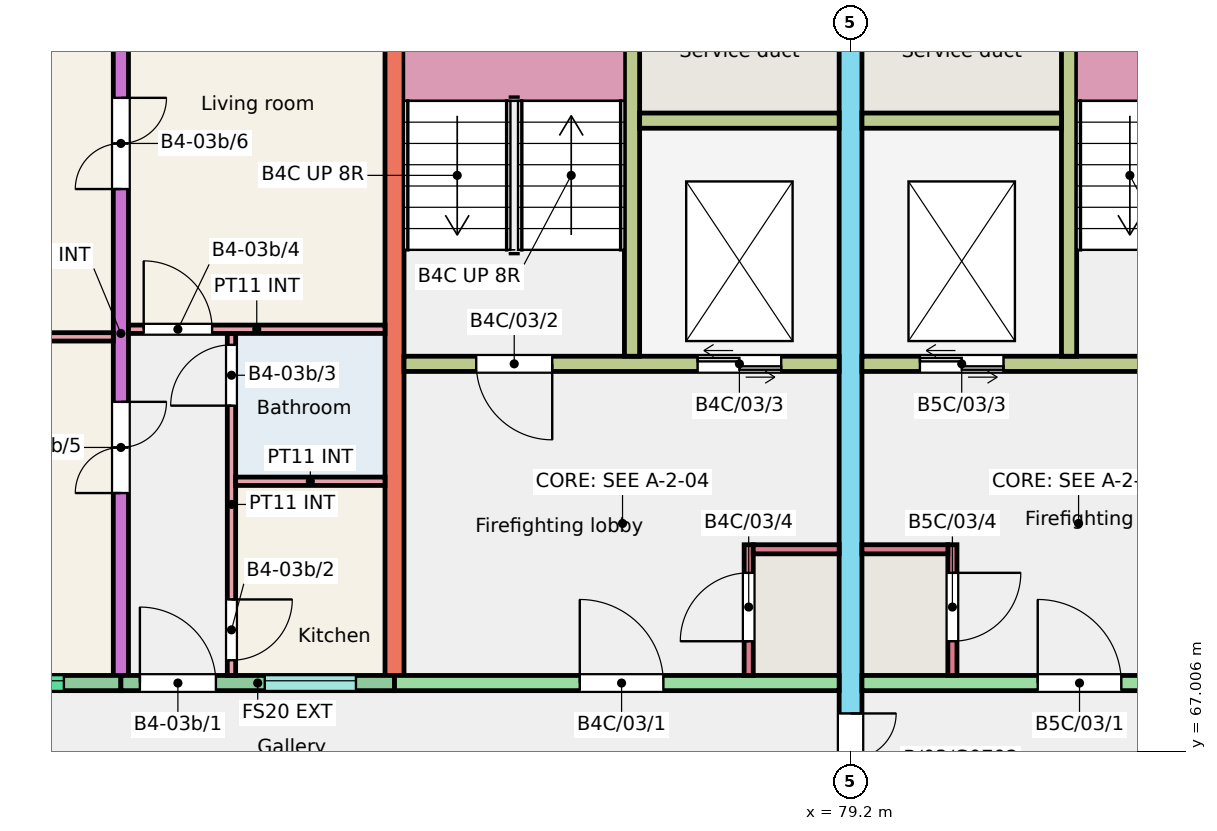
"""IFC4 building model, lengths in metres.
Left out: names, types, materials, properties, quantities, classifications, styles, units other than length and angle.
Written with IfcOpenShell. Run it as: python <this file> out.ifc"""

import sys

from ifc_helpers import new_model, si_unit, direction, frame, frame_2d, origin, place, context, subcontext, project, spatial, rectangle, extrude, element, fill, save


model = new_model("IFC4")
c1 = context("Model", 3, precision=1e-05, world=origin(), true_north=direction((0.0, 1.0)))
c2 = subcontext(c1, "Body", "Model", "MODEL_VIEW")
j1 = project(units=[si_unit("LENGTHUNIT", "METRE"), si_unit("PLANEANGLEUNIT", "RADIAN")], contexts=[c1])
p1 = place(None, origin())
s1 = spatial("IfcSite", under=j1, at=p1, CompositionType="ELEMENT")
p2 = place(p1, origin())
s2 = spatial("IfcBuilding", under=s1, at=p2, CompositionType="ELEMENT")
p3 = place(p2, frame((0.0, 0.0, 9.0)))
s3 = spatial("IfcBuildingStorey", under=s2, at=p3, CompositionType="ELEMENT", Elevation=9.0)
p4 = place(p3, frame((69.6, 68.0, 0.0), z_axis=(0.0, 0.0, 1.0), x_axis=(0.0, 1.0, 0.0)))
e1 = element("IfcWall", 1, at=p4, inside=s3, PredefinedType="SHEAR", context=c2, shape_type="SweptSolid", body=[
    extrude(rectangle(XDim=9.0, YDim=0.2, at=frame_2d((4.5, 0.0))), origin(), (0.0, 0.0, 1.0), 3.0),
])
p5 = place(p4, frame((2.4, 0.0, 0.0)))
e2 = element("IfcOpeningElement", 2, at=p5, cuts=e1, PredefinedType="OPENING", context=c2, shape_type="SweptSolid", body=[
    extrude(rectangle(XDim=1.2, YDim=2.1, at=frame_2d((0.6, 1.05))), frame((0.0, 0.11, 0.0), z_axis=(0.0, -1.0, 0.0), x_axis=(1.0, 0.0, 0.0)), (0.0, 0.0, 1.0), 0.22),
])
p6 = place(p4, frame((6.4, 0.0, 0.0)))
e3 = element("IfcOpeningElement", 3, at=p6, cuts=e1, PredefinedType="OPENING", context=c2, shape_type="SweptSolid", body=[
    extrude(rectangle(XDim=1.2, YDim=2.1, at=frame_2d((0.6, 1.05))), frame((0.0, 0.11, 0.0), z_axis=(0.0, -1.0, 0.0), x_axis=(1.0, 0.0, 0.0)), (0.0, 0.0, 1.0), 0.22),
])
p7 = place(p3, frame((73.2, 68.0, 0.0), z_axis=(0.0, 0.0, 1.0), x_axis=(0.0, 1.0, 0.0)))
e4 = element("IfcWall", 4, at=p7, inside=s3, PredefinedType="SHEAR", context=c2, shape_type="SweptSolid", body=[
    extrude(rectangle(XDim=9.0, YDim=0.25, at=frame_2d((4.5, 0.0))), origin(), (0.0, 0.0, 1.0), 3.0),
])
p8 = place(p3, frame((79.2, 66.0, 0.0), z_axis=(0.0, 0.0, 1.0), x_axis=(0.0, 1.0, 0.0)))
e5 = element("IfcWall", 5, at=p8, inside=s3, PredefinedType="SHEAR", context=c2, shape_type="SweptSolid", body=[
    extrude(rectangle(XDim=11.0, YDim=0.3, at=frame_2d((5.5, 0.0))), origin(), (0.0, 0.0, 1.0), 3.0),
])
p9 = place(p8, frame((0.3, 0.0, 0.0)))
e6 = element("IfcOpeningElement", 6, at=p9, cuts=e5, PredefinedType="OPENING", context=c2, shape_type="SweptSolid", body=[
    extrude(rectangle(XDim=1.2, YDim=2.1, at=frame_2d((0.6, 1.05))), frame((0.0, 0.16, 0.0), z_axis=(0.0, -1.0, 0.0), x_axis=(1.0, 0.0, 0.0)), (0.0, 0.0, 1.0), 0.32),
])
p10 = place(p3, frame((66.0, 67.9, 0.0), z_axis=(0.0, 0.0, 1.0), x_axis=(1.0, 0.0, 0.0)))
e7 = element("IfcWall", 7, at=p10, inside=s3, PredefinedType="SOLIDWALL", context=c2, shape_type="SweptSolid", body=[
    extrude(rectangle(XDim=3.6, YDim=0.2, at=frame_2d((1.8, 0.0))), origin(), (0.0, 0.0, 1.0), 3.0),
])
p11 = place(p10, frame((0.75, 0.0, 1.2)))
e8 = element("IfcOpeningElement", 8, at=p11, cuts=e7, PredefinedType="OPENING", context=c2, shape_type="SweptSolid", body=[
    extrude(rectangle(XDim=2.1, YDim=1.2, at=frame_2d((1.05, 0.6))), frame((0.0, 0.11, 0.0), z_axis=(0.0, -1.0, 0.0), x_axis=(1.0, 0.0, 0.0)), (0.0, 0.0, 1.0), 0.22),
])
p12 = place(p3, frame((69.6, 67.9, 0.0), z_axis=(0.0, 0.0, 1.0), x_axis=(1.0, 0.0, 0.0)))
e9 = element("IfcWall", 9, at=p12, inside=s3, PredefinedType="SOLIDWALL", context=c2, shape_type="SweptSolid", body=[
    extrude(rectangle(XDim=3.6, YDim=0.2, at=frame_2d((1.8, 0.0))), origin(), (0.0, 0.0, 1.0), 3.0),
])
p13 = place(p12, frame((1.893, 0.0, 1.1)))
e10 = element("IfcOpeningElement", 10, at=p13, cuts=e9, PredefinedType="OPENING", context=c2, shape_type="SweptSolid", body=[
    extrude(rectangle(XDim=1.2, YDim=1.3, at=frame_2d((0.6, 0.65))), frame((0.0, 0.11, 0.0), z_axis=(0.0, -1.0, 0.0), x_axis=(1.0, 0.0, 0.0)), (0.0, 0.0, 1.0), 0.22),
])
p14 = place(p12, frame((0.25, 0.0, 0.0)))
e11 = element("IfcOpeningElement", 11, at=p14, cuts=e9, PredefinedType="OPENING", context=c2, shape_type="SweptSolid", body=[
    extrude(rectangle(XDim=1.0, YDim=2.1, at=frame_2d((0.5, 1.05))), frame((0.0, 0.11, 0.0), z_axis=(0.0, -1.0, 0.0), x_axis=(1.0, 0.0, 0.0)), (0.0, 0.0, 1.0), 0.22),
])
p15 = place(p3, frame((73.2, 67.9, 0.0), z_axis=(0.0, 0.0, 1.0), x_axis=(1.0, 0.0, 0.0)))
e12 = element("IfcWall", 12, at=p15, inside=s3, PredefinedType="SHEAR", context=c2, shape_type="SweptSolid", body=[
    extrude(rectangle(XDim=5.85, YDim=0.2, at=frame_2d((2.925, 0.0))), origin(), (0.0, 0.0, 1.0), 3.0),
])
p16 = place(p15, frame((2.438, 0.0, 0.0)))
e13 = element("IfcOpeningElement", 13, at=p16, cuts=e12, PredefinedType="OPENING", context=c2, shape_type="SweptSolid", body=[
    extrude(rectangle(XDim=1.1, YDim=2.1, at=frame_2d((0.55, 1.05))), frame((0.0, 0.11, 0.0), z_axis=(0.0, -1.0, 0.0), x_axis=(1.0, 0.0, 0.0)), (0.0, 0.0, 1.0), 0.22),
])
p17 = place(p3, frame((73.325, 72.1, 0.0), z_axis=(0.0, 0.0, 1.0), x_axis=(1.0, 0.0, 0.0)))
e14 = element("IfcWall", 14, at=p17, inside=s3, PredefinedType="SHEAR", context=c2, shape_type="SweptSolid", body=[
    extrude(rectangle(XDim=5.725, YDim=0.2, at=frame_2d((2.863, 0.0))), origin(), (0.0, 0.0, 1.0), 3.0),
])
p18 = place(p17, frame((0.95, 0.0, 0.0)))
e15 = element("IfcOpeningElement", 15, at=p18, cuts=e14, PredefinedType="OPENING", context=c2, shape_type="SweptSolid", body=[
    extrude(rectangle(XDim=1.0, YDim=2.1, at=frame_2d((0.5, 1.05))), frame((0.0, 0.11, 0.0), z_axis=(0.0, -1.0, 0.0), x_axis=(1.0, 0.0, 0.0)), (0.0, 0.0, 1.0), 0.22),
])
p19 = place(p17, frame((3.863, 0.0, 0.0)))
e16 = element("IfcOpeningElement", 16, at=p19, cuts=e14, PredefinedType="OPENING", context=c2, shape_type="SweptSolid", body=[
    extrude(rectangle(XDim=1.1, YDim=2.1, at=frame_2d((0.55, 1.05))), frame((0.0, 0.11, 0.0), z_axis=(0.0, -1.0, 0.0), x_axis=(1.0, 0.0, 0.0)), (0.0, 0.0, 1.0), 0.22),
])
p20 = place(p3, frame((76.325, 72.2, 0.0), z_axis=(0.0, 0.0, 1.0), x_axis=(0.0, 1.0, 0.0)))
e17 = element("IfcWall", 17, at=p20, inside=s3, PredefinedType="SHEAR", context=c2, shape_type="SweptSolid", body=[
    extrude(rectangle(XDim=4.8, YDim=0.2, at=frame_2d((2.4, 0.0))), origin(), (0.0, 0.0, 1.0), 3.0),
])
p21 = place(p3, frame((76.425, 75.3, 0.0), z_axis=(0.0, 0.0, 1.0), x_axis=(1.0, 0.0, 0.0)))
e18 = element("IfcWall", 18, at=p21, inside=s3, PredefinedType="SHEAR", context=c2, shape_type="SweptSolid", body=[
    extrude(rectangle(XDim=2.625, YDim=0.2, at=frame_2d((1.312, 0.0))), origin(), (0.0, 0.0, 1.0), 3.0),
])
p22 = place(p3, frame((77.86, 68.0, 0.0), z_axis=(0.0, 0.0, 1.0), x_axis=(0.0, 1.0, 0.0)))
e19 = element("IfcWall", 19, at=p22, inside=s3, PredefinedType="SHEAR", context=c2, shape_type="SweptSolid", body=[
    extrude(rectangle(XDim=1.72, YDim=0.12, at=frame_2d((0.86, 0.0))), origin(), (0.0, 0.0, 1.0), 3.0),
])
p23 = place(p22, frame((0.45, 0.0, 0.0)))
e20 = element("IfcOpeningElement", 20, at=p23, cuts=e19, PredefinedType="OPENING", context=c2, shape_type="SweptSolid", body=[
    extrude(rectangle(XDim=0.9, YDim=2.1, at=frame_2d((0.45, 1.05))), frame((0.0, 0.07, 0.0), z_axis=(0.0, -1.0, 0.0), x_axis=(1.0, 0.0, 0.0)), (0.0, 0.0, 1.0), 0.14),
])
p24 = place(p3, frame((77.92, 69.66, 0.0), z_axis=(0.0, 0.0, 1.0), x_axis=(1.0, 0.0, 0.0)))
e21 = element("IfcWall", 21, at=p24, inside=s3, PredefinedType="SHEAR", context=c2, shape_type="SweptSolid", body=[
    extrude(rectangle(XDim=1.13, YDim=0.12, at=frame_2d((0.565, 0.0))), origin(), (0.0, 0.0, 1.0), 3.0),
])
p25 = place(p3, frame((79.35, 67.9, 0.0), z_axis=(0.0, 0.0, 1.0), x_axis=(1.0, 0.0, 0.0)))
e22 = element("IfcWall", 22, at=p25, inside=s3, PredefinedType="SHEAR", context=c2, shape_type="SweptSolid", body=[
    extrude(rectangle(XDim=5.85, YDim=0.2, at=frame_2d((2.925, 0.0))), origin(), (0.0, 0.0, 1.0), 3.0),
])
p26 = place(p25, frame((2.312, 0.0, 0.0)))
e23 = element("IfcOpeningElement", 23, at=p26, cuts=e22, PredefinedType="OPENING", context=c2, shape_type="SweptSolid", body=[
    extrude(rectangle(XDim=1.1, YDim=2.1, at=frame_2d((0.55, 1.05))), frame((0.0, 0.11, 0.0), z_axis=(0.0, -1.0, 0.0), x_axis=(1.0, 0.0, 0.0)), (0.0, 0.0, 1.0), 0.22),
])
p27 = place(p3, frame((79.35, 72.1, 0.0), z_axis=(0.0, 0.0, 1.0), x_axis=(1.0, 0.0, 0.0)))
e24 = element("IfcWall", 24, at=p27, inside=s3, PredefinedType="SHEAR", context=c2, shape_type="SweptSolid", body=[
    extrude(rectangle(XDim=5.725, YDim=0.2, at=frame_2d((2.862, 0.0))), origin(), (0.0, 0.0, 1.0), 3.0),
])
p28 = place(p27, frame((3.775, 0.0, 0.0)))
e25 = element("IfcOpeningElement", 25, at=p28, cuts=e24, PredefinedType="OPENING", context=c2, shape_type="SweptSolid", body=[
    extrude(rectangle(XDim=1.0, YDim=2.1, at=frame_2d((0.5, 1.05))), frame((0.0, 0.11, 0.0), z_axis=(0.0, -1.0, 0.0), x_axis=(1.0, 0.0, 0.0)), (0.0, 0.0, 1.0), 0.22),
])
p29 = place(p27, frame((0.762, 0.0, 0.0)))
e26 = element("IfcOpeningElement", 26, at=p29, cuts=e24, PredefinedType="OPENING", context=c2, shape_type="SweptSolid", body=[
    extrude(rectangle(XDim=1.1, YDim=2.1, at=frame_2d((0.55, 1.05))), frame((0.0, 0.11, 0.0), z_axis=(0.0, -1.0, 0.0), x_axis=(1.0, 0.0, 0.0)), (0.0, 0.0, 1.0), 0.22),
])
p30 = place(p3, frame((82.075, 72.2, 0.0), z_axis=(0.0, 0.0, 1.0), x_axis=(0.0, 1.0, 0.0)))
e27 = element("IfcWall", 27, at=p30, inside=s3, PredefinedType="SHEAR", context=c2, shape_type="SweptSolid", body=[
    extrude(rectangle(XDim=4.8, YDim=0.2, at=frame_2d((2.4, 0.0))), origin(), (0.0, 0.0, 1.0), 3.0),
])
p31 = place(p3, frame((79.35, 75.3, 0.0), z_axis=(0.0, 0.0, 1.0), x_axis=(1.0, 0.0, 0.0)))
e28 = element("IfcWall", 28, at=p31, inside=s3, PredefinedType="SHEAR", context=c2, shape_type="SweptSolid", body=[
    extrude(rectangle(XDim=2.625, YDim=0.2, at=frame_2d((1.312, 0.0))), origin(), (0.0, 0.0, 1.0), 3.0),
])
p32 = place(p3, frame((80.54, 68.0, 0.0), z_axis=(0.0, 0.0, 1.0), x_axis=(0.0, 1.0, 0.0)))
e29 = element("IfcWall", 29, at=p32, inside=s3, PredefinedType="SHEAR", context=c2, shape_type="SweptSolid", body=[
    extrude(rectangle(XDim=1.72, YDim=0.12, at=frame_2d((0.86, 0.0))), origin(), (0.0, 0.0, 1.0), 3.0),
])
p33 = place(p32, frame((0.45, 0.0, 0.0)))
e30 = element("IfcOpeningElement", 30, at=p33, cuts=e29, PredefinedType="OPENING", context=c2, shape_type="SweptSolid", body=[
    extrude(rectangle(XDim=0.9, YDim=2.1, at=frame_2d((0.45, 1.05))), frame((0.0, 0.07, 0.0), z_axis=(0.0, -1.0, 0.0), x_axis=(1.0, 0.0, 0.0)), (0.0, 0.0, 1.0), 0.14),
])
p34 = place(p3, frame((79.35, 69.66, 0.0), z_axis=(0.0, 0.0, 1.0), x_axis=(1.0, 0.0, 0.0)))
e31 = element("IfcWall", 31, at=p34, inside=s3, PredefinedType="SHEAR", context=c2, shape_type="SweptSolid", body=[
    extrude(rectangle(XDim=1.13, YDim=0.12, at=frame_2d((0.565, 0.0))), origin(), (0.0, 0.0, 1.0), 3.0),
])
p35 = place(p3, frame((71.055, 68.0, 0.0), z_axis=(0.0, 0.0, 1.0), x_axis=(0.0, 1.0, 0.0)))
e32 = element("IfcWall", 32, at=p35, inside=s3, PredefinedType="PARTITIONING", context=c2, shape_type="SweptSolid", body=[
    extrude(rectangle(XDim=4.5, YDim=0.11, at=frame_2d((2.25, 0.0))), origin(), (0.0, 0.0, 1.0), 2.8),
])
p36 = place(p35, frame((0.2, 0.0, 0.0)))
e33 = element("IfcOpeningElement", 33, at=p36, cuts=e32, PredefinedType="OPENING", context=c2, shape_type="SweptSolid", body=[
    extrude(rectangle(XDim=0.8, YDim=2.1, at=frame_2d((0.4, 1.05))), frame((0.0, 0.065, 0.0), z_axis=(0.0, -1.0, 0.0), x_axis=(1.0, 0.0, 0.0)), (0.0, 0.0, 1.0), 0.13),
])
p37 = place(p35, frame((3.55, 0.0, 0.0)))
e34 = element("IfcOpeningElement", 34, at=p37, cuts=e32, PredefinedType="OPENING", context=c2, shape_type="SweptSolid", body=[
    extrude(rectangle(XDim=0.8, YDim=2.1, at=frame_2d((0.4, 1.05))), frame((0.0, 0.065, 0.0), z_axis=(0.0, -1.0, 0.0), x_axis=(1.0, 0.0, 0.0)), (0.0, 0.0, 1.0), 0.13),
])
p38 = place(p3, frame((71.11, 70.555, 0.0), z_axis=(0.0, 0.0, 1.0), x_axis=(1.0, 0.0, 0.0)))
e35 = element("IfcWall", 35, at=p38, inside=s3, PredefinedType="PARTITIONING", context=c2, shape_type="SweptSolid", body=[
    extrude(rectangle(XDim=1.965, YDim=0.11, at=frame_2d((0.982, 0.0))), origin(), (0.0, 0.0, 1.0), 2.8),
])
p39 = place(p3, frame((69.7, 72.555, 0.0), z_axis=(0.0, 0.0, 1.0), x_axis=(1.0, 0.0, 0.0)))
e36 = element("IfcWall", 36, at=p39, inside=s3, PredefinedType="PARTITIONING", context=c2, shape_type="SweptSolid", body=[
    extrude(rectangle(XDim=3.375, YDim=0.11, at=frame_2d((1.688, 0.0))), origin(), (0.0, 0.0, 1.0), 2.8),
])
p40 = place(p39, frame((0.2, 0.0, 0.0)))
e37 = element("IfcOpeningElement", 37, at=p40, cuts=e36, PredefinedType="OPENING", context=c2, shape_type="SweptSolid", body=[
    extrude(rectangle(XDim=0.9, YDim=2.1, at=frame_2d((0.45, 1.05))), frame((0.0, 0.065, 0.0), z_axis=(0.0, -1.0, 0.0), x_axis=(1.0, 0.0, 0.0)), (0.0, 0.0, 1.0), 0.13),
])
p41 = place(p3, frame((66.1, 72.455, 0.0), z_axis=(0.0, 0.0, 1.0), x_axis=(1.0, 0.0, 0.0)))
e38 = element("IfcWall", 38, at=p41, inside=s3, PredefinedType="PARTITIONING", context=c2, shape_type="SweptSolid", body=[
    extrude(rectangle(XDim=3.4, YDim=0.11, at=frame_2d((1.7, 0.0))), origin(), (0.0, 0.0, 1.0), 2.8),
])
p42 = place(p11, origin())
e39 = element("IfcWindow", 39, at=p42, inside=s3, PartitioningType="SINGLE_PANEL", PredefinedType="WINDOW", context=c2, shape_type="SweptSolid", body=[
    extrude(rectangle(XDim=2.1, YDim=1.2, at=frame_2d((1.05, 0.6))), frame((0.0, 0.06, 0.0), z_axis=(0.0, -1.0, 0.0), x_axis=(1.0, 0.0, 0.0)), (0.0, 0.0, 1.0), 0.06),
])
fill(e8, e39)
p43 = place(p13, origin())
e40 = element("IfcWindow", 40, at=p43, inside=s3, PartitioningType="SINGLE_PANEL", PredefinedType="WINDOW", context=c2, shape_type="SweptSolid", body=[
    extrude(rectangle(XDim=1.2, YDim=1.3, at=frame_2d((0.6, 0.65))), frame((0.0, 0.06, 0.0), z_axis=(0.0, -1.0, 0.0), x_axis=(1.0, 0.0, 0.0)), (0.0, 0.0, 1.0), 0.06),
])
fill(e10, e40)
p44 = place(p14, origin())
e41 = element("IfcDoor", 41, at=p44, inside=s3, OperationType="SINGLE_SWING_LEFT", PredefinedType="DOOR", context=c2, shape_type="SweptSolid", body=[
    extrude(rectangle(XDim=1.0, YDim=2.1, at=frame_2d((0.5, 1.05))), frame((0.0, 0.025, 0.0), z_axis=(0.0, -1.0, 0.0), x_axis=(1.0, 0.0, 0.0)), (0.0, 0.0, 1.0), 0.05),
])
fill(e11, e41)
p45 = place(p36, origin())
e42 = element("IfcDoor", 42, at=p45, inside=s3, OperationType="SINGLE_SWING_RIGHT", PredefinedType="DOOR", context=c2, shape_type="SweptSolid", body=[
    extrude(rectangle(XDim=0.8, YDim=2.1, at=frame_2d((0.4, 1.05))), frame((0.0, 0.025, 0.0), z_axis=(0.0, -1.0, 0.0), x_axis=(1.0, 0.0, 0.0)), (0.0, 0.0, 1.0), 0.05),
])
fill(e33, e42)
p46 = place(p37, origin())
e43 = element("IfcDoor", 43, at=p46, inside=s3, OperationType="SINGLE_SWING_LEFT", PredefinedType="DOOR", context=c2, shape_type="SweptSolid", body=[
    extrude(rectangle(XDim=0.8, YDim=2.1, at=frame_2d((0.4, 1.05))), frame((0.0, 0.025, 0.0), z_axis=(0.0, -1.0, 0.0), x_axis=(1.0, 0.0, 0.0)), (0.0, 0.0, 1.0), 0.05),
])
fill(e34, e43)
p47 = place(p40, origin())
e44 = element("IfcDoor", 44, at=p47, inside=s3, OperationType="SINGLE_SWING_LEFT", PredefinedType="DOOR", context=c2, shape_type="SweptSolid", body=[
    extrude(rectangle(XDim=0.9, YDim=2.1, at=frame_2d((0.45, 1.05))), frame((0.0, 0.025, 0.0), z_axis=(0.0, -1.0, 0.0), x_axis=(1.0, 0.0, 0.0)), (0.0, 0.0, 1.0), 0.05),
])
fill(e37, e44)
p48 = place(p5, origin())
e45 = element("IfcDoor", 45, at=p48, inside=s3, OperationType="DOUBLE_DOOR_SINGLE_SWING", PredefinedType="DOOR", context=c2, shape_type="SweptSolid", body=[
    extrude(rectangle(XDim=1.2, YDim=2.1, at=frame_2d((0.6, 1.05))), frame((0.0, 0.025, 0.0), z_axis=(0.0, -1.0, 0.0), x_axis=(1.0, 0.0, 0.0)), (0.0, 0.0, 1.0), 0.05),
])
fill(e2, e45)
p49 = place(p6, origin())
e46 = element("IfcDoor", 46, at=p49, inside=s3, OperationType="DOUBLE_DOOR_SINGLE_SWING", PredefinedType="DOOR", context=c2, shape_type="SweptSolid", body=[
    extrude(rectangle(XDim=1.2, YDim=2.1, at=frame_2d((0.6, 1.05))), frame((0.0, 0.025, 0.0), z_axis=(0.0, -1.0, 0.0), x_axis=(1.0, 0.0, 0.0)), (0.0, 0.0, 1.0), 0.05),
])
fill(e3, e46)
p50 = place(p16, origin())
e47 = element("IfcDoor", 47, at=p50, inside=s3, OperationType="SINGLE_SWING_LEFT", PredefinedType="DOOR", context=c2, shape_type="SweptSolid", body=[
    extrude(rectangle(XDim=1.1, YDim=2.1, at=frame_2d((0.55, 1.05))), frame((0.0, 0.025, 0.0), z_axis=(0.0, -1.0, 0.0), x_axis=(1.0, 0.0, 0.0)), (0.0, 0.0, 1.0), 0.05),
])
fill(e13, e47)
p51 = place(p18, origin())
e48 = element("IfcDoor", 48, at=p51, inside=s3, OperationType="SINGLE_SWING_RIGHT", PredefinedType="DOOR", context=c2, shape_type="SweptSolid", body=[
    extrude(rectangle(XDim=1.0, YDim=2.1, at=frame_2d((0.5, 1.05))), frame((0.0, 0.025, 0.0), z_axis=(0.0, -1.0, 0.0), x_axis=(1.0, 0.0, 0.0)), (0.0, 0.0, 1.0), 0.05),
])
fill(e15, e48)
p52 = place(p19, origin())
e49 = element("IfcDoor", 49, at=p52, inside=s3, OperationType="DOUBLE_DOOR_SLIDING", PredefinedType="DOOR", context=c2, shape_type="SweptSolid", body=[
    extrude(rectangle(XDim=1.1, YDim=2.1, at=frame_2d((0.55, 1.05))), frame((0.0, 0.025, 0.0), z_axis=(0.0, -1.0, 0.0), x_axis=(1.0, 0.0, 0.0)), (0.0, 0.0, 1.0), 0.05),
])
fill(e16, e49)
p53 = place(p23, origin())
e50 = element("IfcDoor", 50, at=p53, inside=s3, OperationType="SINGLE_SWING_LEFT", PredefinedType="DOOR", context=c2, shape_type="SweptSolid", body=[
    extrude(rectangle(XDim=0.9, YDim=2.1, at=frame_2d((0.45, 1.05))), frame((0.0, 0.025, 0.0), z_axis=(0.0, -1.0, 0.0), x_axis=(1.0, 0.0, 0.0)), (0.0, 0.0, 1.0), 0.05),
])
fill(e20, e50)
p54 = place(p26, origin())
e51 = element("IfcDoor", 51, at=p54, inside=s3, OperationType="SINGLE_SWING_LEFT", PredefinedType="DOOR", context=c2, shape_type="SweptSolid", body=[
    extrude(rectangle(XDim=1.1, YDim=2.1, at=frame_2d((0.55, 1.05))), frame((0.0, 0.025, 0.0), z_axis=(0.0, -1.0, 0.0), x_axis=(1.0, 0.0, 0.0)), (0.0, 0.0, 1.0), 0.05),
])
fill(e23, e51)
p55 = place(p29, origin())
e52 = element("IfcDoor", 52, at=p55, inside=s3, OperationType="DOUBLE_DOOR_SLIDING", PredefinedType="DOOR", context=c2, shape_type="SweptSolid", body=[
    extrude(rectangle(XDim=1.1, YDim=2.1, at=frame_2d((0.55, 1.05))), frame((0.0, 0.025, 0.0), z_axis=(0.0, -1.0, 0.0), x_axis=(1.0, 0.0, 0.0)), (0.0, 0.0, 1.0), 0.05),
])
fill(e26, e52)
p56 = place(p33, origin())
e53 = element("IfcDoor", 53, at=p56, inside=s3, OperationType="SINGLE_SWING_RIGHT", PredefinedType="DOOR", context=c2, shape_type="SweptSolid", body=[
    extrude(rectangle(XDim=0.9, YDim=2.1, at=frame_2d((0.45, 1.05))), frame((0.0, 0.025, 0.0), z_axis=(0.0, -1.0, 0.0), x_axis=(1.0, 0.0, 0.0)), (0.0, 0.0, 1.0), 0.05),
])
fill(e30, e53)
p57 = place(p9, origin())
e54 = element("IfcDoor", 54, at=p57, inside=s3, OperationType="DOUBLE_DOOR_SINGLE_SWING", PredefinedType="DOOR", context=c2, shape_type="SweptSolid", body=[
    extrude(rectangle(XDim=1.2, YDim=2.1, at=frame_2d((0.6, 1.05))), frame((0.0, 0.025, 0.0), z_axis=(0.0, -1.0, 0.0), x_axis=(1.0, 0.0, 0.0)), (0.0, 0.0, 1.0), 0.05),
])
fill(e6, e54)
save(model, sys.argv[1])
